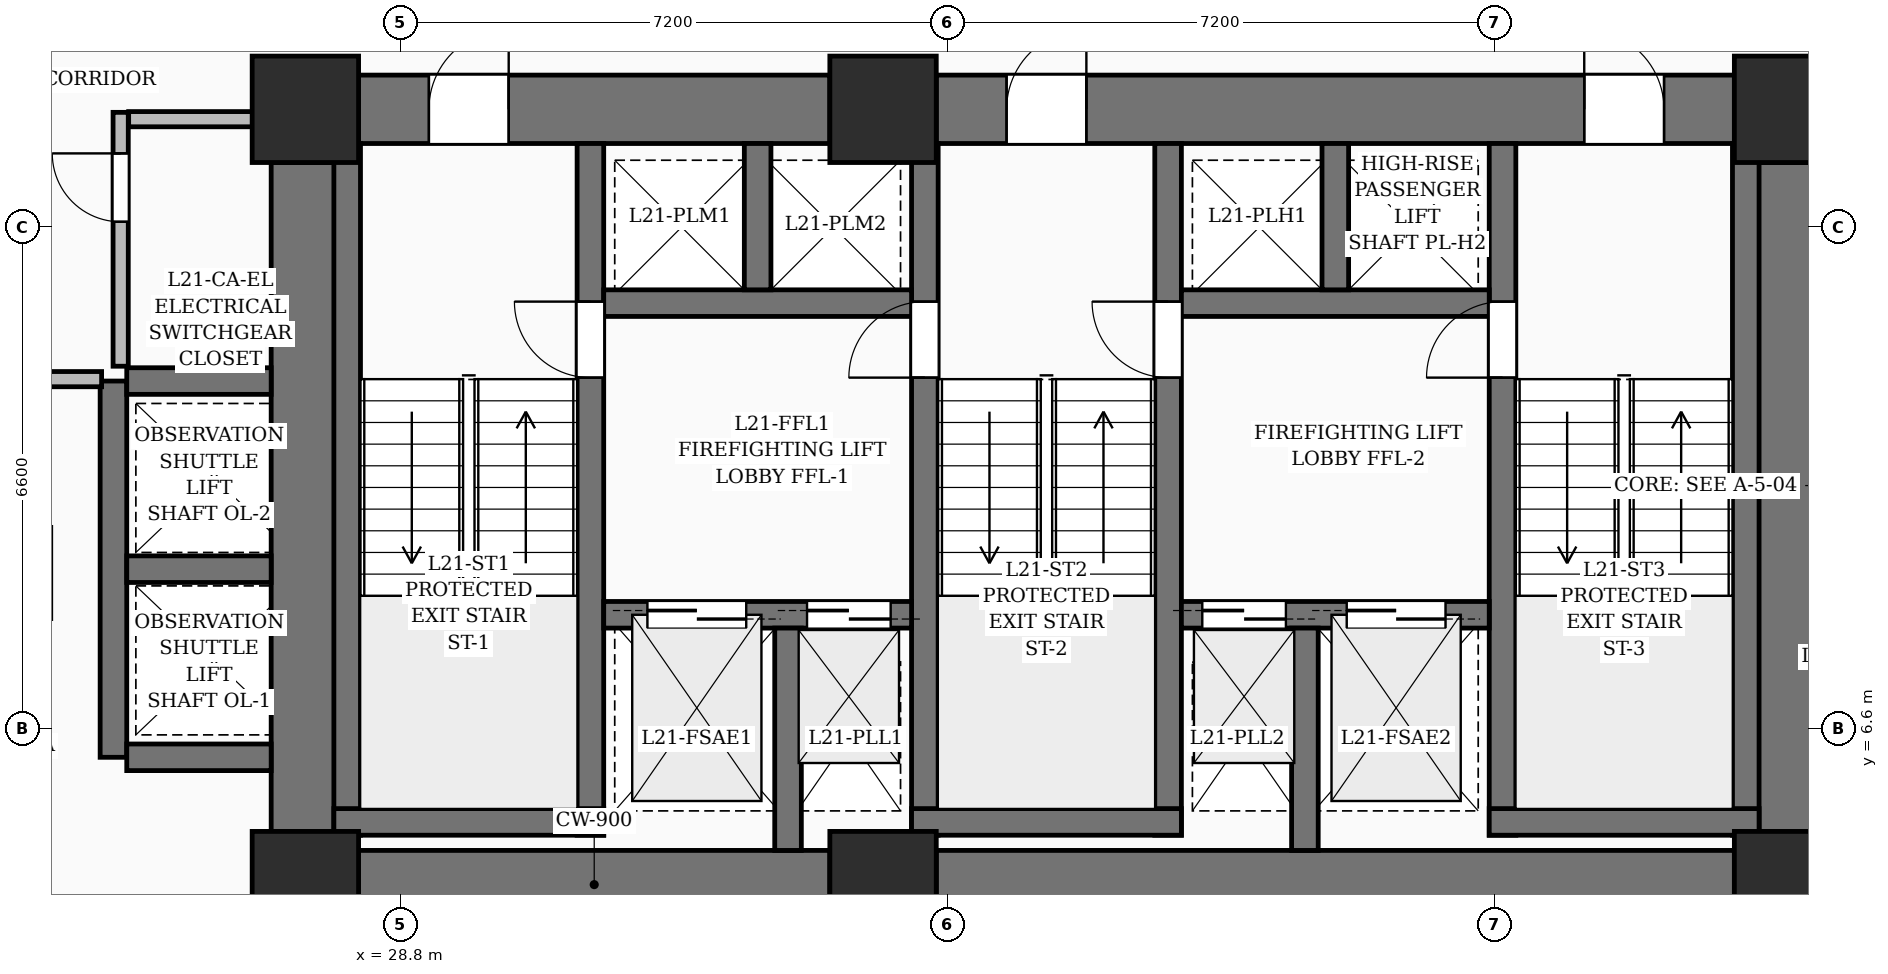
"""IFC4 building model, lengths in metres.
Left out: names, types, materials, properties, quantities, classifications, styles, units other than length and angle.
Written with IfcOpenShell. Run it as: python <this file> out.ifc"""

import sys

from ifc_helpers import new_model, si_unit, direction, frame, frame_2d, origin, origin_2d, place, context, subcontext, project, spatial, rectangle, extrude, element, fill, save


model = new_model("IFC4")
c1 = context("Model", 3, precision=1e-05, world=origin(), true_north=direction((0.0, 1.0)))
c2 = subcontext(c1, "Body", "Model", "MODEL_VIEW")
j1 = project(units=[si_unit("LENGTHUNIT", "METRE"), si_unit("PLANEANGLEUNIT", "RADIAN")], contexts=[c1])
p1 = place(None, origin())
s1 = spatial("IfcSite", under=j1, at=p1, CompositionType="ELEMENT")
p2 = place(p1, origin())
s2 = spatial("IfcBuilding", under=s1, at=p2, CompositionType="ELEMENT")
p3 = place(p2, frame((0.0, 0.0, 85.8)))
s3 = spatial("IfcBuildingStorey", under=s2, at=p3, CompositionType="ELEMENT", Elevation=85.8)
for number, where, z_axis, x_axis in (
    (1, (27.55, 4.55, 0.0), (0.0, 0.0, 1.0), (1.0, 0.0, 0.0)),
    (2, (35.15, 4.55, 0.0), (0.0, 0.0, 1.0), (1.0, 0.0, 0.0)),
    (3, (47.05, 4.55, 0.0), (0.0, 0.0, 1.0), (1.0, 0.0, 0.0)),
    (4, (27.55, 14.75, 0.0), (0.0, 0.0, 1.0), (1.0, 0.0, 0.0)),
    (5, (35.15, 14.75, 0.0), (0.0, 0.0, 1.0), (1.0, 0.0, 0.0)),
    (6, (47.05, 14.75, 0.0), (0.0, 0.0, 1.0), (1.0, 0.0, 0.0)),
):
    element("IfcColumn", number, at=place(p3, frame(where, z_axis=z_axis, x_axis=x_axis)), inside=s3, PredefinedType="COLUMN", context=c2, shape_type="SweptSolid", body=[
        extrude(rectangle(XDim=1.4, YDim=1.4, at=origin_2d()), origin(), (0.0, 0.0, 1.0), 3.6),
    ])
p4 = place(p3, frame((28.25, 4.55, 0.0), z_axis=(0.0, 0.0, 1.0), x_axis=(1.0, 0.0, 0.0)))
e7 = element("IfcWall", 7, at=p4, inside=s3, PredefinedType="SHEAR", context=c2, shape_type="SweptSolid", body=[
    extrude(rectangle(XDim=6.2, YDim=0.9, at=frame_2d((3.1, 0.0))), origin(), (0.0, 0.0, 1.0), 3.6),
])
p5 = place(p3, frame((35.85, 4.55, 0.0), z_axis=(0.0, 0.0, 1.0), x_axis=(1.0, 0.0, 0.0)))
e8 = element("IfcWall", 8, at=p5, inside=s3, PredefinedType="SHEAR", context=c2, shape_type="SweptSolid", body=[
    extrude(rectangle(XDim=10.5, YDim=0.9, at=frame_2d((5.25, 0.0))), origin(), (0.0, 0.0, 1.0), 3.6),
])
p6 = place(p3, frame((28.25, 14.75, 0.0), z_axis=(0.0, 0.0, 1.0), x_axis=(1.0, 0.0, 0.0)))
e9 = element("IfcWall", 9, at=p6, inside=s3, PredefinedType="SHEAR", context=c2, shape_type="SweptSolid", body=[
    extrude(rectangle(XDim=6.2, YDim=0.9, at=frame_2d((3.1, 0.0))), origin(), (0.0, 0.0, 1.0), 3.6),
])
p7 = place(p6, frame((0.925, 0.0, 0.0)))
e10 = element("IfcOpeningElement", 10, at=p7, cuts=e9, PredefinedType="OPENING", context=c2, shape_type="SweptSolid", body=[
    extrude(rectangle(XDim=1.05, YDim=2.15, at=frame_2d((0.525, 1.075))), frame((0.0, 0.46, 0.0), z_axis=(0.0, -1.0, 0.0), x_axis=(1.0, 0.0, 0.0)), (0.0, 0.0, 1.0), 0.92),
])
p8 = place(p3, frame((35.85, 14.75, 0.0), z_axis=(0.0, 0.0, 1.0), x_axis=(1.0, 0.0, 0.0)))
e11 = element("IfcWall", 11, at=p8, inside=s3, PredefinedType="SHEAR", context=c2, shape_type="SweptSolid", body=[
    extrude(rectangle(XDim=10.5, YDim=0.9, at=frame_2d((5.25, 0.0))), origin(), (0.0, 0.0, 1.0), 3.6),
])
p9 = place(p8, frame((0.925, 0.0, 0.0)))
e12 = element("IfcOpeningElement", 12, at=p9, cuts=e11, PredefinedType="OPENING", context=c2, shape_type="SweptSolid", body=[
    extrude(rectangle(XDim=1.05, YDim=2.15, at=frame_2d((0.525, 1.075))), frame((0.0, 0.46, 0.0), z_axis=(0.0, -1.0, 0.0), x_axis=(1.0, 0.0, 0.0)), (0.0, 0.0, 1.0), 0.92),
])
p10 = place(p8, frame((8.525, 0.0, 0.0)))
e13 = element("IfcOpeningElement", 13, at=p10, cuts=e11, PredefinedType="OPENING", context=c2, shape_type="SweptSolid", body=[
    extrude(rectangle(XDim=1.05, YDim=2.15, at=frame_2d((0.525, 1.075))), frame((0.0, 0.46, 0.0), z_axis=(0.0, -1.0, 0.0), x_axis=(1.0, 0.0, 0.0)), (0.0, 0.0, 1.0), 0.92),
])
for number, where, z_axis, x_axis in (
    (14, (27.55, 5.25, 0.0), (0.0, 0.0, 1.0), (0.0, 1.0, 0.0)),
    (15, (47.05, 5.25, 0.0), (0.0, 0.0, 1.0), (0.0, 1.0, 0.0)),
):
    element("IfcWall", number, at=place(p3, frame(where, z_axis=z_axis, x_axis=x_axis)), inside=s3, PredefinedType="SHEAR", context=c2, shape_type="SweptSolid", body=[
        extrude(rectangle(XDim=8.8, YDim=0.9, at=frame_2d((4.4, 0.0))), origin(), (0.0, 0.0, 1.0), 3.6),
    ])
p11 = place(p3, frame((28.1, 5.2, 0.0), z_axis=(0.0, 0.0, 1.0), x_axis=(0.0, 1.0, 0.0)))
e16 = element("IfcWall", 16, at=p11, inside=s3, PredefinedType="SOLIDWALL", context=c2, shape_type="SweptSolid", body=[
    extrude(rectangle(XDim=9.1, YDim=0.35, at=frame_2d((4.55, 0.0))), origin(), (0.0, 0.0, 1.0), 3.6),
])
p12 = place(p3, frame((31.3, 5.2, 0.0), z_axis=(0.0, 0.0, 1.0), x_axis=(0.0, 1.0, 0.0)))
e17 = element("IfcWall", 17, at=p12, inside=s3, PredefinedType="SOLIDWALL", context=c2, shape_type="SweptSolid", body=[
    extrude(rectangle(XDim=9.1, YDim=0.35, at=frame_2d((4.55, 0.0))), origin(), (0.0, 0.0, 1.0), 3.6),
])
p13 = place(p12, frame((6.02, 0.0, 0.0)))
e18 = element("IfcOpeningElement", 18, at=p13, cuts=e17, PredefinedType="OPENING", context=c2, shape_type="SweptSolid", body=[
    extrude(rectangle(XDim=1.0, YDim=2.15, at=frame_2d((0.5, 1.075))), frame((0.0, 0.185, 0.0), z_axis=(0.0, -1.0, 0.0), x_axis=(1.0, 0.0, 0.0)), (0.0, 0.0, 1.0), 0.37),
])
p14 = place(p3, frame((27.925, 5.375, 0.0), z_axis=(0.0, 0.0, 1.0), x_axis=(1.0, 0.0, 0.0)))
e19 = element("IfcWall", 19, at=p14, inside=s3, PredefinedType="SOLIDWALL", context=c2, shape_type="SweptSolid", body=[
    extrude(rectangle(XDim=3.55, YDim=0.35, at=frame_2d((1.775, 0.0))), origin(), (0.0, 0.0, 1.0), 3.6),
])
p15 = place(p3, frame((35.7, 5.2, 0.0), z_axis=(0.0, 0.0, 1.0), x_axis=(0.0, 1.0, 0.0)))
e20 = element("IfcWall", 20, at=p15, inside=s3, PredefinedType="SOLIDWALL", context=c2, shape_type="SweptSolid", body=[
    extrude(rectangle(XDim=9.1, YDim=0.35, at=frame_2d((4.55, 0.0))), origin(), (0.0, 0.0, 1.0), 3.6),
])
p16 = place(p15, frame((6.02, 0.0, 0.0)))
e21 = element("IfcOpeningElement", 21, at=p16, cuts=e20, PredefinedType="OPENING", context=c2, shape_type="SweptSolid", body=[
    extrude(rectangle(XDim=1.0, YDim=2.15, at=frame_2d((0.5, 1.075))), frame((0.0, 0.185, 0.0), z_axis=(0.0, -1.0, 0.0), x_axis=(1.0, 0.0, 0.0)), (0.0, 0.0, 1.0), 0.37),
])
p17 = place(p3, frame((38.9, 5.2, 0.0), z_axis=(0.0, 0.0, 1.0), x_axis=(0.0, 1.0, 0.0)))
e22 = element("IfcWall", 22, at=p17, inside=s3, PredefinedType="SOLIDWALL", context=c2, shape_type="SweptSolid", body=[
    extrude(rectangle(XDim=9.1, YDim=0.35, at=frame_2d((4.55, 0.0))), origin(), (0.0, 0.0, 1.0), 3.6),
])
p18 = place(p17, frame((6.02, 0.0, 0.0)))
e23 = element("IfcOpeningElement", 23, at=p18, cuts=e22, PredefinedType="OPENING", context=c2, shape_type="SweptSolid", body=[
    extrude(rectangle(XDim=1.0, YDim=2.15, at=frame_2d((0.5, 1.075))), frame((0.0, 0.185, 0.0), z_axis=(0.0, -1.0, 0.0), x_axis=(1.0, 0.0, 0.0)), (0.0, 0.0, 1.0), 0.37),
])
p19 = place(p3, frame((35.525, 5.375, 0.0), z_axis=(0.0, 0.0, 1.0), x_axis=(1.0, 0.0, 0.0)))
e24 = element("IfcWall", 24, at=p19, inside=s3, PredefinedType="SOLIDWALL", context=c2, shape_type="SweptSolid", body=[
    extrude(rectangle(XDim=3.55, YDim=0.35, at=frame_2d((1.775, 0.0))), origin(), (0.0, 0.0, 1.0), 3.6),
])
p20 = place(p3, frame((43.3, 5.2, 0.0), z_axis=(0.0, 0.0, 1.0), x_axis=(0.0, 1.0, 0.0)))
e25 = element("IfcWall", 25, at=p20, inside=s3, PredefinedType="SOLIDWALL", context=c2, shape_type="SweptSolid", body=[
    extrude(rectangle(XDim=9.1, YDim=0.35, at=frame_2d((4.55, 0.0))), origin(), (0.0, 0.0, 1.0), 3.6),
])
p21 = place(p20, frame((6.02, 0.0, 0.0)))
e26 = element("IfcOpeningElement", 26, at=p21, cuts=e25, PredefinedType="OPENING", context=c2, shape_type="SweptSolid", body=[
    extrude(rectangle(XDim=1.0, YDim=2.15, at=frame_2d((0.5, 1.075))), frame((0.0, 0.185, 0.0), z_axis=(0.0, -1.0, 0.0), x_axis=(1.0, 0.0, 0.0)), (0.0, 0.0, 1.0), 0.37),
])
p22 = place(p3, frame((46.5, 5.2, 0.0), z_axis=(0.0, 0.0, 1.0), x_axis=(0.0, 1.0, 0.0)))
e27 = element("IfcWall", 27, at=p22, inside=s3, PredefinedType="SOLIDWALL", context=c2, shape_type="SweptSolid", body=[
    extrude(rectangle(XDim=9.1, YDim=0.35, at=frame_2d((4.55, 0.0))), origin(), (0.0, 0.0, 1.0), 3.6),
])
p23 = place(p3, frame((43.125, 5.375, 0.0), z_axis=(0.0, 0.0, 1.0), x_axis=(1.0, 0.0, 0.0)))
e28 = element("IfcWall", 28, at=p23, inside=s3, PredefinedType="SOLIDWALL", context=c2, shape_type="SweptSolid", body=[
    extrude(rectangle(XDim=3.55, YDim=0.35, at=frame_2d((1.775, 0.0))), origin(), (0.0, 0.0, 1.0), 3.6),
])
p24 = place(p3, frame((31.475, 8.1, 0.0), z_axis=(0.0, 0.0, 1.0), x_axis=(1.0, 0.0, 0.0)))
e29 = element("IfcWall", 29, at=p24, inside=s3, PredefinedType="SOLIDWALL", context=c2, shape_type="SweptSolid", body=[
    extrude(rectangle(XDim=4.05, YDim=0.35, at=frame_2d((2.025, 0.0))), origin(), (0.0, 0.0, 1.0), 3.6),
])
p25 = place(p24, frame((0.575, 0.0, 0.0)))
e30 = element("IfcOpeningElement", 30, at=p25, cuts=e29, PredefinedType="OPENING", context=c2, shape_type="SweptSolid", body=[
    extrude(rectangle(XDim=1.3, YDim=2.25, at=frame_2d((0.65, 1.125))), frame((0.0, 0.185, 0.0), z_axis=(0.0, -1.0, 0.0), x_axis=(1.0, 0.0, 0.0)), (0.0, 0.0, 1.0), 0.37),
])
p26 = place(p24, frame((2.675, 0.0, 0.0)))
e31 = element("IfcOpeningElement", 31, at=p26, cuts=e29, PredefinedType="OPENING", context=c2, shape_type="SweptSolid", body=[
    extrude(rectangle(XDim=1.1, YDim=2.2, at=frame_2d((0.55, 1.1))), frame((0.0, 0.185, 0.0), z_axis=(0.0, -1.0, 0.0), x_axis=(1.0, 0.0, 0.0)), (0.0, 0.0, 1.0), 0.37),
])
p27 = place(p3, frame((39.075, 8.1, 0.0), z_axis=(0.0, 0.0, 1.0), x_axis=(1.0, 0.0, 0.0)))
e32 = element("IfcWall", 32, at=p27, inside=s3, PredefinedType="SOLIDWALL", context=c2, shape_type="SweptSolid", body=[
    extrude(rectangle(XDim=4.05, YDim=0.35, at=frame_2d((2.025, 0.0))), origin(), (0.0, 0.0, 1.0), 3.6),
])
p28 = place(p27, frame((2.175, 0.0, 0.0)))
e33 = element("IfcOpeningElement", 33, at=p28, cuts=e32, PredefinedType="OPENING", context=c2, shape_type="SweptSolid", body=[
    extrude(rectangle(XDim=1.3, YDim=2.25, at=frame_2d((0.65, 1.125))), frame((0.0, 0.185, 0.0), z_axis=(0.0, -1.0, 0.0), x_axis=(1.0, 0.0, 0.0)), (0.0, 0.0, 1.0), 0.37),
])
p29 = place(p27, frame((0.275, 0.0, 0.0)))
e34 = element("IfcOpeningElement", 34, at=p29, cuts=e32, PredefinedType="OPENING", context=c2, shape_type="SweptSolid", body=[
    extrude(rectangle(XDim=1.1, YDim=2.2, at=frame_2d((0.55, 1.1))), frame((0.0, 0.185, 0.0), z_axis=(0.0, -1.0, 0.0), x_axis=(1.0, 0.0, 0.0)), (0.0, 0.0, 1.0), 0.37),
])
for number, where, z_axis, x_axis in (
    (35, (33.9, 5.0, 0.0), (0.0, 0.0, 1.0), (0.0, 1.0, 0.0)),
    (36, (40.7, 5.0, 0.0), (0.0, 0.0, 1.0), (0.0, 1.0, 0.0)),
):
    element("IfcWall", number, at=place(p3, frame(where, z_axis=z_axis, x_axis=x_axis)), inside=s3, PredefinedType="SOLIDWALL", context=c2, shape_type="SweptSolid", body=[
        extrude(rectangle(XDim=2.925, YDim=0.35, at=frame_2d((1.462, 0.0))), origin(), (0.0, 0.0, 1.0), 3.6),
    ])
p30 = place(p3, frame((31.475, 12.2, 0.0), z_axis=(0.0, 0.0, 1.0), x_axis=(1.0, 0.0, 0.0)))
e37 = element("IfcWall", 37, at=p30, inside=s3, PredefinedType="SOLIDWALL", context=c2, shape_type="SweptSolid", body=[
    extrude(rectangle(XDim=4.05, YDim=0.35, at=frame_2d((2.025, 0.0))), origin(), (0.0, 0.0, 1.0), 3.6),
])
p31 = place(p3, frame((33.5, 12.375, 0.0), z_axis=(0.0, 0.0, 1.0), x_axis=(0.0, 1.0, 0.0)))
e38 = element("IfcWall", 38, at=p31, inside=s3, PredefinedType="SOLIDWALL", context=c2, shape_type="SweptSolid", body=[
    extrude(rectangle(XDim=1.925, YDim=0.35, at=frame_2d((0.962, 0.0))), origin(), (0.0, 0.0, 1.0), 3.6),
])
p32 = place(p3, frame((39.075, 12.2, 0.0), z_axis=(0.0, 0.0, 1.0), x_axis=(1.0, 0.0, 0.0)))
e39 = element("IfcWall", 39, at=p32, inside=s3, PredefinedType="SOLIDWALL", context=c2, shape_type="SweptSolid", body=[
    extrude(rectangle(XDim=4.05, YDim=0.35, at=frame_2d((2.025, 0.0))), origin(), (0.0, 0.0, 1.0), 3.6),
])
p33 = place(p3, frame((41.1, 12.375, 0.0), z_axis=(0.0, 0.0, 1.0), x_axis=(0.0, 1.0, 0.0)))
e40 = element("IfcWall", 40, at=p33, inside=s3, PredefinedType="SOLIDWALL", context=c2, shape_type="SweptSolid", body=[
    extrude(rectangle(XDim=1.925, YDim=0.35, at=frame_2d((0.962, 0.0))), origin(), (0.0, 0.0, 1.0), 3.6),
])
p34 = place(p3, frame((25.025, 6.225, 0.0), z_axis=(0.0, 0.0, 1.0), x_axis=(0.0, 1.0, 0.0)))
e41 = element("IfcWall", 41, at=p34, inside=s3, PredefinedType="SOLIDWALL", context=c2, shape_type="SweptSolid", body=[
    extrude(rectangle(XDim=4.95, YDim=0.35, at=frame_2d((2.475, 0.0))), origin(), (0.0, 0.0, 1.0), 3.6),
])
for number, where, z_axis, x_axis in (
    (42, (25.2, 6.225, 0.0), (0.0, 0.0, 1.0), (1.0, 0.0, 0.0)),
    (43, (25.2, 8.7, 0.0), (0.0, 0.0, 1.0), (1.0, 0.0, 0.0)),
    (44, (25.2, 11.175, 0.0), (0.0, 0.0, 1.0), (1.0, 0.0, 0.0)),
):
    element("IfcWall", number, at=place(p3, frame(where, z_axis=z_axis, x_axis=x_axis)), inside=s3, PredefinedType="SOLIDWALL", context=c2, shape_type="SweptSolid", body=[
        extrude(rectangle(XDim=1.9, YDim=0.35, at=frame_2d((0.95, 0.0))), origin(), (0.0, 0.0, 1.0), 3.6),
    ])
p35 = place(p3, frame((25.12, 11.37, 0.0), z_axis=(0.0, 0.0, 1.0), x_axis=(0.0, 1.0, 0.0)))
e45 = element("IfcWall", 45, at=p35, inside=s3, PredefinedType="PARTITIONING", context=c2, shape_type="SweptSolid", body=[
    extrude(rectangle(XDim=3.34, YDim=0.2, at=frame_2d((1.67, 0.0))), origin(), (0.0, 0.0, 1.0), 3.35),
])
p36 = place(p35, frame((1.9, 0.0, 0.0)))
e46 = element("IfcOpeningElement", 46, at=p36, cuts=e45, PredefinedType="OPENING", context=c2, shape_type="SweptSolid", body=[
    extrude(rectangle(XDim=0.9, YDim=2.1, at=frame_2d((0.45, 1.05))), frame((0.0, 0.11, 0.0), z_axis=(0.0, -1.0, 0.0), x_axis=(1.0, 0.0, 0.0)), (0.0, 0.0, 1.0), 0.22),
])
p37 = place(p3, frame((25.225, 14.62, 0.0), z_axis=(0.0, 0.0, 1.0), x_axis=(1.0, 0.0, 0.0)))
e47 = element("IfcWall", 47, at=p37, inside=s3, PredefinedType="PARTITIONING", context=c2, shape_type="SweptSolid", body=[
    extrude(rectangle(XDim=1.86, YDim=0.2, at=frame_2d((0.93, 0.0))), origin(), (0.0, 0.0, 1.0), 3.35),
])
p38 = place(p3, frame((21.485, 11.2, 0.0), z_axis=(0.0, 0.0, 1.0), x_axis=(1.0, 0.0, 0.0)))
e48 = element("IfcWall", 48, at=p38, inside=s3, PredefinedType="PARTITIONING", context=c2, shape_type="SweptSolid", body=[
    extrude(rectangle(XDim=3.384, YDim=0.2, at=frame_2d((1.692, 0.0))), origin(), (0.0, 0.0, 1.0), 3.35),
])
p39 = place(p38, frame((0.89, 0.0, 0.0)))
e49 = element("IfcOpeningElement", 49, at=p39, cuts=e48, PredefinedType="OPENING", context=c2, shape_type="SweptSolid", body=[
    extrude(rectangle(XDim=1.6, YDim=2.3, at=frame_2d((0.8, 1.15))), frame((0.0, 0.11, 0.0), z_axis=(0.0, -1.0, 0.0), x_axis=(1.0, 0.0, 0.0)), (0.0, 0.0, 1.0), 0.22),
])
p40 = place(p7, origin())
e50 = element("IfcDoor", 50, at=p40, inside=s3, OperationType="SINGLE_SWING_RIGHT", PredefinedType="DOOR", context=c2, shape_type="SweptSolid", body=[
    extrude(rectangle(XDim=1.05, YDim=2.15, at=frame_2d((0.525, 1.075))), frame((0.0, 0.025, 0.0), z_axis=(0.0, -1.0, 0.0), x_axis=(1.0, 0.0, 0.0)), (0.0, 0.0, 1.0), 0.05),
])
fill(e10, e50)
p41 = place(p9, origin())
e51 = element("IfcDoor", 51, at=p41, inside=s3, OperationType="SINGLE_SWING_RIGHT", PredefinedType="DOOR", context=c2, shape_type="SweptSolid", body=[
    extrude(rectangle(XDim=1.05, YDim=2.15, at=frame_2d((0.525, 1.075))), frame((0.0, 0.025, 0.0), z_axis=(0.0, -1.0, 0.0), x_axis=(1.0, 0.0, 0.0)), (0.0, 0.0, 1.0), 0.05),
])
fill(e12, e51)
p42 = place(p10, origin())
e52 = element("IfcDoor", 52, at=p42, inside=s3, OperationType="SINGLE_SWING_LEFT", PredefinedType="DOOR", context=c2, shape_type="SweptSolid", body=[
    extrude(rectangle(XDim=1.05, YDim=2.15, at=frame_2d((0.525, 1.075))), frame((0.0, 0.025, 0.0), z_axis=(0.0, -1.0, 0.0), x_axis=(1.0, 0.0, 0.0)), (0.0, 0.0, 1.0), 0.05),
])
fill(e13, e52)
p43 = place(p13, origin())
e53 = element("IfcDoor", 53, at=p43, inside=s3, OperationType="SINGLE_SWING_RIGHT", PredefinedType="DOOR", context=c2, shape_type="SweptSolid", body=[
    extrude(rectangle(XDim=1.0, YDim=2.15, at=frame_2d((0.5, 1.075))), frame((0.0, 0.025, 0.0), z_axis=(0.0, -1.0, 0.0), x_axis=(1.0, 0.0, 0.0)), (0.0, 0.0, 1.0), 0.05),
])
fill(e18, e53)
p44 = place(p16, origin())
e54 = element("IfcDoor", 54, at=p44, inside=s3, OperationType="SINGLE_SWING_LEFT", PredefinedType="DOOR", context=c2, shape_type="SweptSolid", body=[
    extrude(rectangle(XDim=1.0, YDim=2.15, at=frame_2d((0.5, 1.075))), frame((0.0, 0.025, 0.0), z_axis=(0.0, -1.0, 0.0), x_axis=(1.0, 0.0, 0.0)), (0.0, 0.0, 1.0), 0.05),
])
fill(e21, e54)
p45 = place(p18, origin())
e55 = element("IfcDoor", 55, at=p45, inside=s3, OperationType="SINGLE_SWING_RIGHT", PredefinedType="DOOR", context=c2, shape_type="SweptSolid", body=[
    extrude(rectangle(XDim=1.0, YDim=2.15, at=frame_2d((0.5, 1.075))), frame((0.0, 0.025, 0.0), z_axis=(0.0, -1.0, 0.0), x_axis=(1.0, 0.0, 0.0)), (0.0, 0.0, 1.0), 0.05),
])
fill(e23, e55)
p46 = place(p21, origin())
e56 = element("IfcDoor", 56, at=p46, inside=s3, OperationType="SINGLE_SWING_LEFT", PredefinedType="DOOR", context=c2, shape_type="SweptSolid", body=[
    extrude(rectangle(XDim=1.0, YDim=2.15, at=frame_2d((0.5, 1.075))), frame((0.0, 0.025, 0.0), z_axis=(0.0, -1.0, 0.0), x_axis=(1.0, 0.0, 0.0)), (0.0, 0.0, 1.0), 0.05),
])
fill(e26, e56)
p47 = place(p25, origin())
e57 = element("IfcDoor", 57, at=p47, inside=s3, OperationType="DOUBLE_DOOR_SLIDING", PredefinedType="DOOR", context=c2, shape_type="SweptSolid", body=[
    extrude(rectangle(XDim=1.3, YDim=2.25, at=frame_2d((0.65, 1.125))), frame((0.0, 0.025, 0.0), z_axis=(0.0, -1.0, 0.0), x_axis=(1.0, 0.0, 0.0)), (0.0, 0.0, 1.0), 0.05),
])
fill(e30, e57)
p48 = place(p28, origin())
e58 = element("IfcDoor", 58, at=p48, inside=s3, OperationType="DOUBLE_DOOR_SLIDING", PredefinedType="DOOR", context=c2, shape_type="SweptSolid", body=[
    extrude(rectangle(XDim=1.3, YDim=2.25, at=frame_2d((0.65, 1.125))), frame((0.0, 0.025, 0.0), z_axis=(0.0, -1.0, 0.0), x_axis=(1.0, 0.0, 0.0)), (0.0, 0.0, 1.0), 0.05),
])
fill(e33, e58)
p49 = place(p26, origin())
e59 = element("IfcDoor", 59, at=p49, inside=s3, OperationType="DOUBLE_DOOR_SLIDING", PredefinedType="DOOR", context=c2, shape_type="SweptSolid", body=[
    extrude(rectangle(XDim=1.1, YDim=2.2, at=frame_2d((0.55, 1.1))), frame((0.0, 0.025, 0.0), z_axis=(0.0, -1.0, 0.0), x_axis=(1.0, 0.0, 0.0)), (0.0, 0.0, 1.0), 0.05),
])
fill(e31, e59)
p50 = place(p29, origin())
e60 = element("IfcDoor", 60, at=p50, inside=s3, OperationType="DOUBLE_DOOR_SLIDING", PredefinedType="DOOR", context=c2, shape_type="SweptSolid", body=[
    extrude(rectangle(XDim=1.1, YDim=2.2, at=frame_2d((0.55, 1.1))), frame((0.0, 0.025, 0.0), z_axis=(0.0, -1.0, 0.0), x_axis=(1.0, 0.0, 0.0)), (0.0, 0.0, 1.0), 0.05),
])
fill(e34, e60)
p51 = place(p36, origin())
e61 = element("IfcDoor", 61, at=p51, inside=s3, OperationType="SINGLE_SWING_RIGHT", PredefinedType="DOOR", context=c2, shape_type="SweptSolid", body=[
    extrude(rectangle(XDim=0.9, YDim=2.1, at=frame_2d((0.45, 1.05))), frame((0.0, 0.025, 0.0), z_axis=(0.0, -1.0, 0.0), x_axis=(1.0, 0.0, 0.0)), (0.0, 0.0, 1.0), 0.05),
])
fill(e46, e61)
save(model, sys.argv[1])
